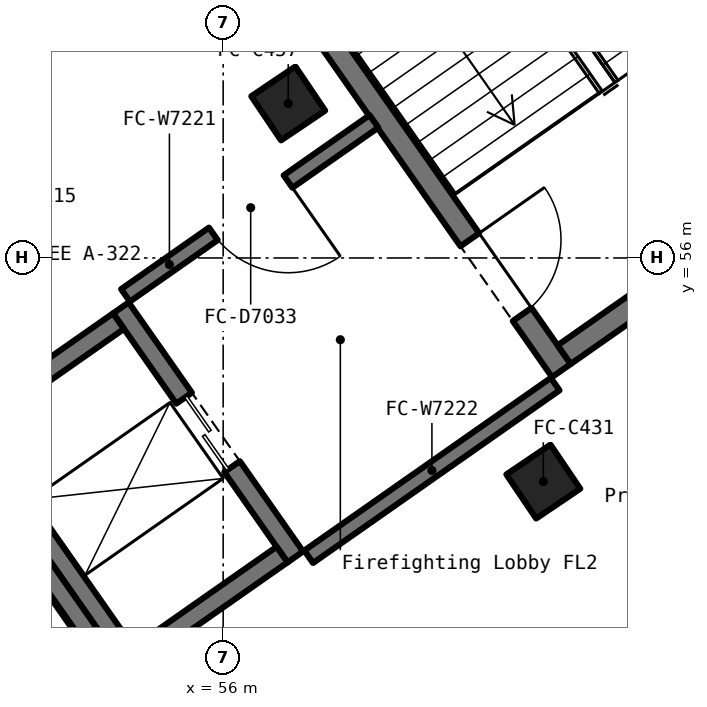
"""IFC4 building model, lengths in metres.
Left out: names, types, materials, properties, quantities, classifications, styles, units other than length and angle.
Written with IfcOpenShell. Run it as: python <this file> out.ifc"""

import sys

from ifc_helpers import new_model, si_unit, direction, frame, frame_2d, origin, origin_2d, place, context, subcontext, project, spatial, rectangle, extrude, element, fill, save


model = new_model("IFC4")
c1 = context("Model", 3, precision=1e-05, world=origin(), true_north=direction((0.0, 1.0)))
c2 = subcontext(c1, "Body", "Model", "MODEL_VIEW")
j1 = project(units=[si_unit("LENGTHUNIT", "METRE"), si_unit("PLANEANGLEUNIT", "RADIAN")], contexts=[c1])
p1 = place(None, origin())
s1 = spatial("IfcSite", under=j1, at=p1, CompositionType="ELEMENT")
p2 = place(p1, origin())
s2 = spatial("IfcBuilding", under=s1, at=p2, CompositionType="ELEMENT")
p3 = place(p2, frame((0.0, 0.0, 6.0)))
s3 = spatial("IfcBuildingStorey", under=s2, at=p3, CompositionType="ELEMENT", Elevation=6.0)
for number, where, z_axis, x_axis in (
    (1, (60.212, 53.058, 0.0), (0.0, 0.0, 1.0), (0.829, 0.559, 0.0)),
    (2, (56.856, 58.033, 0.0), (0.0, 0.0, 1.0), (0.829, 0.559, 0.0)),
):
    element("IfcColumn", number, at=place(p3, frame(where, z_axis=z_axis, x_axis=x_axis)), inside=s3, PredefinedType="COLUMN", context=c2, shape_type="SweptSolid", body=[
        extrude(rectangle(XDim=0.7, YDim=0.7, at=origin_2d()), origin(), (0.0, 0.0, 1.0), 5.5),
    ])
p4 = place(p3, frame((64.791, 57.559, 0.0), z_axis=(0.0, 0.0, 1.0), x_axis=(-0.573514776444, 0.819195215563, 0.0)))
e3 = element("IfcWall", 3, at=p4, inside=s3, PredefinedType="SOLIDWALL", context=c2, shape_type="SweptSolid", body=[
    extrude(rectangle(XDim=10.0, YDim=0.3, at=frame_2d((5.0, 0.0))), origin(), (0.0, 0.0, 1.0), 5.5),
])
p5 = place(p3, frame((54.714, 62.711, 0.0), z_axis=(0.0, 0.0, 1.0), x_axis=(0.573563925118, -0.819160804606, 0.0)))
e4 = element("IfcWall", 4, at=p5, inside=s3, PredefinedType="SOLIDWALL", context=c2, shape_type="SweptSolid", body=[
    extrude(rectangle(XDim=10.0, YDim=0.3, at=frame_2d((5.0, 0.0))), origin(), (0.0, 0.0, 1.0), 5.5),
])
p6 = place(p5, frame((7.9, 0.0, 0.0)))
e5 = element("IfcOpeningElement", 5, at=p6, cuts=e4, PredefinedType="OPENING", context=c2, shape_type="SweptSolid", body=[
    extrude(rectangle(XDim=1.2, YDim=2.1, at=frame_2d((0.6, 1.05))), frame((0.0, 0.162, 0.0), z_axis=(0.0, -1.0, 0.0), x_axis=(1.0, 0.0, 0.0)), (0.0, 0.0, 1.0), 0.324),
])
p7 = place(p3, frame((60.487, 54.728, 0.0), z_axis=(0.0, 0.0, 1.0), x_axis=(0.819096538389, 0.573655698829, 0.0)))
e6 = element("IfcWall", 6, at=p7, inside=s3, PredefinedType="SOLIDWALL", context=c2, shape_type="SweptSolid", body=[
    extrude(rectangle(XDim=4.999, YDim=0.3, at=frame_2d((2.5, 0.0))), origin(), (0.0, 0.0, 1.0), 5.5),
])
p8 = place(p3, frame((56.949, 52.067, 0.0), z_axis=(0.0, 0.0, 1.0), x_axis=(-0.573736768582, 0.819039755065, 0.0)))
e7 = element("IfcWall", 7, at=p8, inside=s3, PredefinedType="SOLIDWALL", context=c2, shape_type="SweptSolid", body=[
    extrude(rectangle(XDim=4.0, YDim=0.25, at=frame_2d((2.0, 0.0))), origin(), (0.0, 0.0, 1.0), 5.5),
])
p9 = place(p8, frame((1.45, 0.0, 0.0)))
e8 = element("IfcOpeningElement", 8, at=p9, cuts=e7, PredefinedType="OPENING", context=c2, shape_type="SweptSolid", body=[
    extrude(rectangle(XDim=1.1, YDim=2.1, at=frame_2d((0.55, 1.05))), frame((0.0, 0.137, 0.0), z_axis=(0.0, -1.0, 0.0), x_axis=(1.0, 0.0, 0.0)), (0.0, 0.0, 1.0), 0.274),
])
p10 = place(p3, frame((54.623, 55.169, 0.0), z_axis=(0.0, 0.0, 1.0), x_axis=(-0.819226933165, -0.573469469089, 0.0)))
e9 = element("IfcWall", 9, at=p10, inside=s3, PredefinedType="SOLIDWALL", context=c2, shape_type="SweptSolid", body=[
    extrude(rectangle(XDim=2.3, YDim=0.25, at=frame_2d((1.15, 0.0))), origin(), (0.0, 0.0, 1.0), 5.5),
])
p11 = place(p3, frame((52.565, 53.881, 0.0), z_axis=(0.0, 0.0, 1.0), x_axis=(0.573572956461, -0.819154480923, 0.0)))
e10 = element("IfcWall", 10, at=p11, inside=s3, PredefinedType="SOLIDWALL", context=c2, shape_type="SweptSolid", body=[
    extrude(rectangle(XDim=4.0, YDim=0.25, at=frame_2d((2.0, 0.0))), origin(), (0.0, 0.0, 1.0), 5.5),
])
p12 = place(p3, frame((54.89, 50.779, 0.0), z_axis=(0.0, 0.0, 1.0), x_axis=(0.819366508838, 0.573270027295, 0.0)))
e11 = element("IfcWall", 11, at=p12, inside=s3, PredefinedType="SOLIDWALL", context=c2, shape_type="SweptSolid", body=[
    extrude(rectangle(XDim=2.301, YDim=0.25, at=frame_2d((1.15, 0.0))), origin(), (0.0, 0.0, 1.0), 5.5),
])
p13 = place(p3, frame((54.655, 50.461, 0.0), z_axis=(0.0, 0.0, 1.0), x_axis=(-0.573572956461, 0.819154480923, 0.0)))
e12 = element("IfcWall", 12, at=p13, inside=s3, PredefinedType="SOLIDWALL", context=c2, shape_type="SweptSolid", body=[
    extrude(rectangle(XDim=4.0, YDim=0.25, at=frame_2d((2.0, 0.0))), origin(), (0.0, 0.0, 1.0), 5.5),
])
p14 = place(p3, frame((57.984, 57.797, 0.0), z_axis=(0.0, 0.0, 1.0), x_axis=(-0.819125561737, -0.573614255497, 0.0)))
e13 = element("IfcWall", 13, at=p14, inside=s3, PredefinedType="PARTITIONING", context=c2, shape_type="SweptSolid", body=[
    extrude(rectangle(XDim=3.99, YDim=0.2, at=frame_2d((1.995, 0.0))), origin(), (0.0, 0.0, 1.0), 5.28),
])
p15 = place(p14, frame((1.38, 0.0, 0.0)))
e14 = element("IfcOpeningElement", 14, at=p15, cuts=e13, PredefinedType="OPENING", context=c2, shape_type="SweptSolid", body=[
    extrude(rectangle(XDim=1.2, YDim=2.1, at=frame_2d((0.6, 1.05))), frame((0.0, 0.112, 0.0), z_axis=(0.0, -1.0, 0.0), x_axis=(1.0, 0.0, 0.0)), (0.0, 0.0, 1.0), 0.224),
])
p16 = place(p3, frame((57.125, 52.069, 0.0), z_axis=(0.0, 0.0, 1.0), x_axis=(0.81911891796, 0.573623742744, 0.0)))
e15 = element("IfcWall", 15, at=p16, inside=s3, PredefinedType="PARTITIONING", context=c2, shape_type="SweptSolid", body=[
    extrude(rectangle(XDim=3.959, YDim=0.2, at=frame_2d((1.979, 0.0))), origin(), (0.0, 0.0, 1.0), 5.28),
])
p17 = place(p6, origin())
e16 = element("IfcDoor", 16, at=p17, inside=s3, OperationType="SINGLE_SWING_LEFT", PredefinedType="DOOR", context=c2, shape_type="SweptSolid", body=[
    extrude(rectangle(XDim=1.2, YDim=2.1, at=frame_2d((0.6, 1.05))), frame((0.0, 0.025, 0.0), z_axis=(0.0, -1.0, 0.0), x_axis=(1.0, 0.0, 0.0)), (0.0, 0.0, 1.0), 0.05),
])
fill(e5, e16)
p18 = place(p9, origin())
e17 = element("IfcDoor", 17, at=p18, inside=s3, OperationType="DOUBLE_DOOR_SLIDING", PredefinedType="DOOR", context=c2, shape_type="SweptSolid", body=[
    extrude(rectangle(XDim=1.1, YDim=2.1, at=frame_2d((0.55, 1.05))), frame((0.0, 0.025, 0.0), z_axis=(0.0, -1.0, 0.0), x_axis=(1.0, 0.0, 0.0)), (0.0, 0.0, 1.0), 0.05),
])
fill(e8, e17)
p19 = place(p15, origin())
e18 = element("IfcDoor", 18, at=p19, inside=s3, OperationType="SINGLE_SWING_LEFT", PredefinedType="DOOR", context=c2, shape_type="SweptSolid", body=[
    extrude(rectangle(XDim=1.2, YDim=2.1, at=frame_2d((0.6, 1.05))), frame((0.0, 0.025, 0.0), z_axis=(0.0, -1.0, 0.0), x_axis=(1.0, 0.0, 0.0)), (0.0, 0.0, 1.0), 0.05),
])
fill(e14, e18)
save(model, sys.argv[1])
